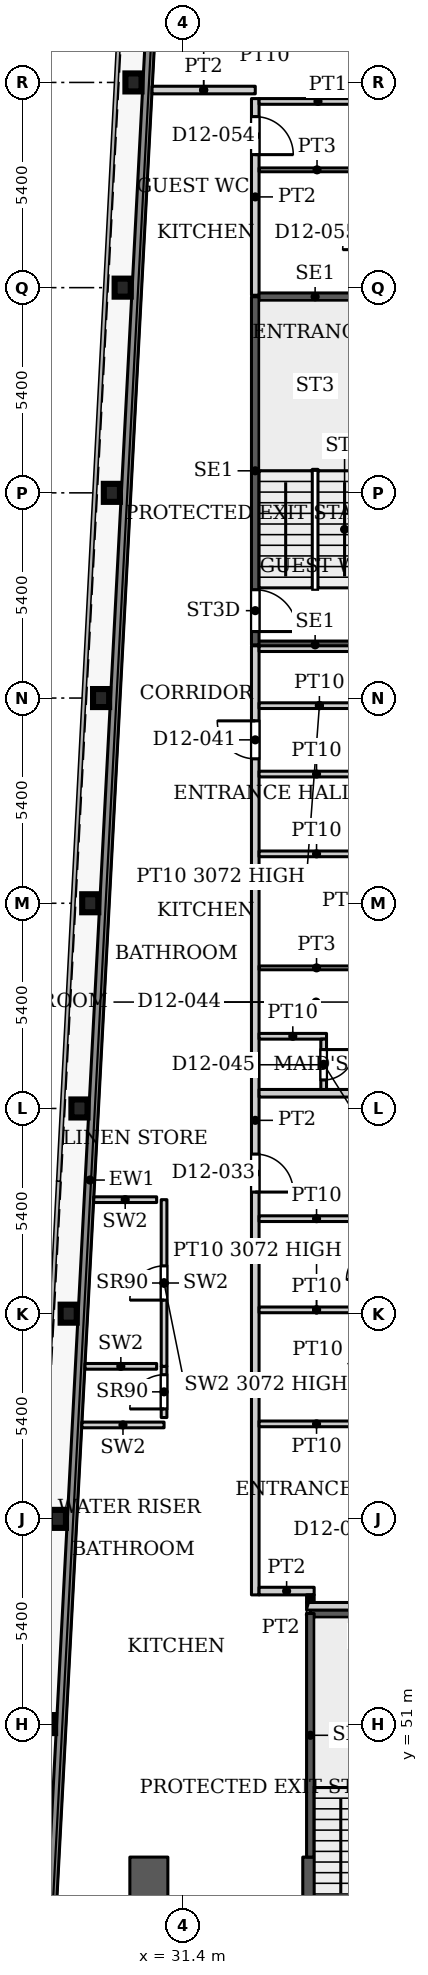
"""IFC4 building model, lengths in metres.
Left out: names, types, materials, properties, quantities, classifications, styles, units other than length and angle.
Written with IfcOpenShell. Run it as: python <this file> out.ifc"""

import sys

from ifc_helpers import new_model, si_unit, direction, frame, frame_2d, origin, origin_2d, place, context, subcontext, project, spatial, rectangle, i_section, extrude, source, transform, mapped, element, fill, save


model = new_model("IFC4")
c1 = context("Model", 3, precision=1e-05, world=origin(), true_north=direction((0.0, 1.0)))
c2 = subcontext(c1, "Body", "Model", "MODEL_VIEW")
j1 = project(units=[si_unit("LENGTHUNIT", "METRE"), si_unit("PLANEANGLEUNIT", "RADIAN")], contexts=[c1])
p1 = place(None, origin())
s1 = spatial("IfcSite", under=j1, at=p1, CompositionType="ELEMENT")
p2 = place(p1, origin())
s2 = spatial("IfcBuilding", under=s1, at=p2, CompositionType="ELEMENT")
p3 = place(p2, frame((0.0, 0.0, 57.8)))
s3 = spatial("IfcBuildingStorey", under=s2, at=p3, CompositionType="ELEMENT", Elevation=57.8)
for number, where, z_axis, x_axis in (
    (1, (27.822, 51.0, 0.0), (0.0, 0.0, 1.0), (1.0, 0.0, 0.0)),
    (2, (28.106, 56.4, 0.0), (0.0, 0.0, 1.0), (1.0, 0.0, 0.0)),
    (3, (28.39, 61.8, 0.0), (0.0, 0.0, 1.0), (1.0, 0.0, 0.0)),
    (4, (28.674, 67.2, 0.0), (0.0, 0.0, 1.0), (1.0, 0.0, 0.0)),
    (5, (28.958, 72.6, 0.0), (0.0, 0.0, 1.0), (1.0, 0.0, 0.0)),
    (6, (29.243, 78.0, 0.0), (0.0, 0.0, 1.0), (1.0, 0.0, 0.0)),
    (7, (29.527, 83.4, 0.0), (0.0, 0.0, 1.0), (1.0, 0.0, 0.0)),
    (8, (29.811, 88.8, 0.0), (0.0, 0.0, 1.0), (1.0, 0.0, 0.0)),
    (9, (30.095, 94.2, 0.0), (0.0, 0.0, 1.0), (1.0, 0.0, 0.0)),
):
    element("IfcColumn", number, at=place(p3, frame(where, z_axis=z_axis, x_axis=x_axis)), inside=s3, PredefinedType="COLUMN", context=c2, shape_type="SweptSolid", body=[
        extrude(i_section(OverallWidth=0.424, OverallDepth=0.474, WebThickness=0.048, FlangeThickness=0.077, FilletRadius=0.014, at=origin_2d()), origin(), (0.0, 0.0, 1.0), 3.9),
    ])
p4 = place(p3, frame((34.75, 29.05, 0.0), z_axis=(0.0, 0.0, 1.0), x_axis=(0.0, 1.0, 0.0)))
e10 = element("IfcWall", 10, at=p4, inside=s3, PredefinedType="SHEAR", context=c2, shape_type="SweptSolid", body=[
    extrude(rectangle(XDim=18.45, YDim=0.4, at=frame_2d((9.225, 0.0))), origin(), (0.0, 0.0, 1.0), 3.9),
])
p5 = place(p4, frame((8.025, 0.0, 0.0)))
e11 = element("IfcOpeningElement", 11, at=p5, cuts=e10, PredefinedType="OPENING", context=c2, shape_type="SweptSolid", body=[
    extrude(rectangle(XDim=1.1, YDim=2.2, at=frame_2d((0.55, 1.1))), frame((0.0, 0.21, 0.0), z_axis=(0.0, -1.0, 0.0), x_axis=(1.0, 0.0, 0.0)), (0.0, 0.0, 1.0), 0.42),
])
p6 = place(p4, frame((10.875, 0.0, 0.0)))
e12 = element("IfcOpeningElement", 12, at=p6, cuts=e10, PredefinedType="OPENING", context=c2, shape_type="SweptSolid", body=[
    extrude(rectangle(XDim=1.1, YDim=2.2, at=frame_2d((0.55, 1.1))), frame((0.0, 0.21, 0.0), z_axis=(0.0, -1.0, 0.0), x_axis=(1.0, 0.0, 0.0)), (0.0, 0.0, 1.0), 0.42),
])
p7 = place(p4, frame((13.725, 0.0, 0.0)))
e13 = element("IfcOpeningElement", 13, at=p7, cuts=e10, PredefinedType="OPENING", context=c2, shape_type="SweptSolid", body=[
    extrude(rectangle(XDim=1.1, YDim=2.2, at=frame_2d((0.55, 1.1))), frame((0.0, 0.21, 0.0), z_axis=(0.0, -1.0, 0.0), x_axis=(1.0, 0.0, 0.0)), (0.0, 0.0, 1.0), 0.42),
])
p8 = place(p4, frame((15.95, 0.0, 0.0)))
e14 = element("IfcOpeningElement", 14, at=p8, cuts=e10, PredefinedType="OPENING", context=c2, shape_type="SweptSolid", body=[
    extrude(rectangle(XDim=1.1, YDim=2.2, at=frame_2d((0.55, 1.1))), frame((0.0, 0.21, 0.0), z_axis=(0.0, -1.0, 0.0), x_axis=(1.0, 0.0, 0.0)), (0.0, 0.0, 1.0), 0.42),
])
p9 = place(p3, frame((30.5, 29.05, 0.0), z_axis=(0.0, 0.0, 1.0), x_axis=(0.0, 1.0, 0.0)))
e15 = element("IfcWall", 15, at=p9, inside=s3, PredefinedType="SHEAR", context=c2, shape_type="SweptSolid", body=[
    extrude(rectangle(XDim=18.45, YDim=1.0, at=frame_2d((9.225, 0.0))), origin(), (0.0, 0.0, 1.0), 3.9),
])
p10 = place(p9, frame((1.5, 0.0, 0.0)))
e16 = element("IfcOpeningElement", 16, at=p10, cuts=e15, PredefinedType="OPENING", context=c2, shape_type="SweptSolid", body=[
    extrude(rectangle(XDim=0.9, YDim=2.2, at=frame_2d((0.45, 1.1))), frame((0.0, 0.51, 0.0), z_axis=(0.0, -1.0, 0.0), x_axis=(1.0, 0.0, 0.0)), (0.0, 0.0, 1.0), 1.02),
])
p11 = place(p9, frame((6.03, 0.0, 0.0)))
e17 = element("IfcOpeningElement", 17, at=p11, cuts=e15, PredefinedType="OPENING", context=c2, shape_type="SweptSolid", body=[
    extrude(rectangle(XDim=0.9, YDim=2.2, at=frame_2d((0.45, 1.1))), frame((0.0, 0.51, 0.0), z_axis=(0.0, -1.0, 0.0), x_axis=(1.0, 0.0, 0.0)), (0.0, 0.0, 1.0), 1.02),
])
p12 = place(p9, frame((9.7, 0.0, 0.0)))
e18 = element("IfcOpeningElement", 18, at=p12, cuts=e15, PredefinedType="OPENING", context=c2, shape_type="SweptSolid", body=[
    extrude(rectangle(XDim=0.9, YDim=2.2, at=frame_2d((0.45, 1.1))), frame((0.0, 0.51, 0.0), z_axis=(0.0, -1.0, 0.0), x_axis=(1.0, 0.0, 0.0)), (0.0, 0.0, 1.0), 1.02),
])
p13 = place(p3, frame((27.195, 31.969, 0.0), z_axis=(0.0, 0.0, 1.0), x_axis=(0.052554995867, 0.998618031286, 0.0)))
e19 = element("IfcWall", 19, at=p13, inside=s3, PredefinedType="SOLIDWALL", context=c2, shape_type="SweptSolid", body=[
    extrude(rectangle(XDim=66.787, YDim=0.25, at=frame_2d((33.394, 0.0))), origin(), (0.0, 0.0, 1.0), 3.75),
])
p14 = place(p3, frame((34.75, 53.91, 0.0), z_axis=(0.0, 0.0, 1.0), x_axis=(1.0, 0.0, 0.0)))
e20 = element("IfcWall", 20, at=p14, inside=s3, PredefinedType="SHEAR", context=c2, shape_type="SweptSolid", body=[
    extrude(rectangle(XDim=3.15, YDim=0.2, at=frame_2d((1.575, 0.0))), origin(), (0.0, 0.0, 1.0), 3.9),
])
p15 = place(p3, frame((34.75, 47.5, 0.0), z_axis=(0.0, 0.0, 1.0), x_axis=(0.0, 1.0, 0.0)))
e21 = element("IfcWall", 21, at=p15, inside=s3, PredefinedType="SHEAR", context=c2, shape_type="SweptSolid", body=[
    extrude(rectangle(XDim=6.41, YDim=0.2, at=frame_2d((3.205, 0.0))), origin(), (0.0, 0.0, 1.0), 3.9),
])
for number, where, z_axis, x_axis in (
    (22, (33.3, 79.4, 0.0), (0.0, 0.0, 1.0), (1.0, 0.0, 0.0)),
    (23, (33.3, 88.56, 0.0), (0.0, 0.0, 1.0), (1.0, 0.0, 0.0)),
):
    element("IfcWall", number, at=place(p3, frame(where, z_axis=z_axis, x_axis=x_axis)), inside=s3, PredefinedType="SHEAR", context=c2, shape_type="SweptSolid", body=[
        extrude(rectangle(XDim=3.15, YDim=0.2, at=frame_2d((1.575, 0.0))), origin(), (0.0, 0.0, 1.0), 3.9),
    ])
p16 = place(p3, frame((33.3, 79.4, 0.0), z_axis=(0.0, 0.0, 1.0), x_axis=(0.0, 1.0, 0.0)))
e24 = element("IfcWall", 24, at=p16, inside=s3, PredefinedType="SHEAR", context=c2, shape_type="SweptSolid", body=[
    extrude(rectangle(XDim=9.16, YDim=0.2, at=frame_2d((4.58, 0.0))), origin(), (0.0, 0.0, 1.0), 3.9),
])
p17 = place(p16, frame((0.35, 0.0, 0.0)))
e25 = element("IfcOpeningElement", 25, at=p17, cuts=e24, PredefinedType="OPENING", context=c2, shape_type="SweptSolid", body=[
    extrude(rectangle(XDim=1.1, YDim=2.2, at=frame_2d((0.55, 1.1))), frame((0.0, 0.11, 0.0), z_axis=(0.0, -1.0, 0.0), x_axis=(1.0, 0.0, 0.0)), (0.0, 0.0, 1.0), 0.22),
])
p18 = place(p3, frame((28.738, 58.872, 0.0), z_axis=(0.0, 0.0, 1.0), x_axis=(1.0, 0.0, 0.0)))
e26 = element("IfcWall", 26, at=p18, inside=s3, PredefinedType="PARTITIONING", context=c2, shape_type="SweptSolid", body=[
    extrude(rectangle(XDim=2.162, YDim=0.15, at=frame_2d((1.081, 0.0))), origin(), (0.0, 0.0, 1.0), 3.9),
])
p19 = place(p3, frame((30.9, 59.067, 0.0), z_axis=(0.0, 0.0, 1.0), x_axis=(0.0, 1.0, 0.0)))
e27 = element("IfcWall", 27, at=p19, inside=s3, PredefinedType="PARTITIONING", context=c2, shape_type="SweptSolid", body=[
    extrude(rectangle(XDim=1.347, YDim=0.15, at=frame_2d((0.674, 0.0))), origin(), (0.0, 0.0, 1.0), 3.9),
])
p20 = place(p19, frame((0.226, 0.0, 0.0)))
e28 = element("IfcOpeningElement", 28, at=p20, cuts=e27, PredefinedType="OPENING", context=c2, shape_type="SweptSolid", body=[
    extrude(rectangle(XDim=0.9, YDim=2.2, at=frame_2d((0.45, 1.1))), frame((0.0, 0.085, 0.0), z_axis=(0.0, -1.0, 0.0), x_axis=(1.0, 0.0, 0.0)), (0.0, 0.0, 1.0), 0.17),
])
p21 = place(p3, frame((28.82, 60.414, 0.0), z_axis=(0.0, 0.0, 1.0), x_axis=(1.0, 0.0, 0.0)))
e29 = element("IfcWall", 29, at=p21, inside=s3, PredefinedType="PARTITIONING", context=c2, shape_type="SweptSolid", body=[
    extrude(rectangle(XDim=1.885, YDim=0.15, at=frame_2d((0.942, 0.0))), origin(), (0.0, 0.0, 1.0), 3.9),
])
p22 = place(p3, frame((30.9, 60.414, 0.0), z_axis=(0.0, 0.0, 1.0), x_axis=(0.0, 1.0, 0.0)))
e30 = element("IfcWall", 30, at=p22, inside=s3, PredefinedType="PARTITIONING", context=c2, shape_type="SweptSolid", body=[
    extrude(rectangle(XDim=4.386, YDim=0.15, at=frame_2d((2.193, 0.0))), origin(), (0.0, 0.0, 1.0), 3.072),
])
p23 = place(p22, frame((1.743, 0.0, 0.0)))
e31 = element("IfcOpeningElement", 31, at=p23, cuts=e30, PredefinedType="OPENING", context=c2, shape_type="SweptSolid", body=[
    extrude(rectangle(XDim=0.9, YDim=2.2, at=frame_2d((0.45, 1.1))), frame((0.0, 0.085, 0.0), z_axis=(0.0, -1.0, 0.0), x_axis=(1.0, 0.0, 0.0)), (0.0, 0.0, 1.0), 0.17),
])
p24 = place(p3, frame((29.05, 64.8, 0.0), z_axis=(0.0, 0.0, 1.0), x_axis=(1.0, 0.0, 0.0)))
e32 = element("IfcWall", 32, at=p24, inside=s3, PredefinedType="PARTITIONING", context=c2, shape_type="SweptSolid", body=[
    extrude(rectangle(XDim=1.655, YDim=0.15, at=frame_2d((0.828, 0.0))), origin(), (0.0, 0.0, 1.0), 3.9),
])
p25 = place(p3, frame((30.585, 94.0, 0.0), z_axis=(0.0, 0.0, 1.0), x_axis=(1.0, 0.0, 0.0)))
e33 = element("IfcWall", 33, at=p25, inside=s3, PredefinedType="PARTITIONING", context=c2, shape_type="SweptSolid", body=[
    extrude(rectangle(XDim=2.715, YDim=0.2, at=frame_2d((1.358, 0.0))), origin(), (0.0, 0.0, 1.0), 3.147),
])
p26 = place(p3, frame((33.3, 54.4, 0.0), z_axis=(0.0, 0.0, 1.0), x_axis=(0.0, 1.0, 0.0)))
e34 = element("IfcWall", 34, at=p26, inside=s3, PredefinedType="PARTITIONING", context=c2, shape_type="SweptSolid", body=[
    extrude(rectangle(XDim=24.975, YDim=0.2, at=frame_2d((12.488, 0.0))), origin(), (0.0, 0.0, 1.0), 3.6),
])
p27 = place(p26, frame((10.6, 0.0, 0.0)))
e35 = element("IfcOpeningElement", 35, at=p27, cuts=e34, PredefinedType="OPENING", context=c2, shape_type="SweptSolid", body=[
    extrude(rectangle(XDim=1.0, YDim=2.1, at=frame_2d((0.5, 1.05))), frame((0.0, 0.11, 0.0), z_axis=(0.0, -1.0, 0.0), x_axis=(1.0, 0.0, 0.0)), (0.0, 0.0, 1.0), 0.22),
])
p28 = place(p26, frame((22.0, 0.0, 0.0)))
e36 = element("IfcOpeningElement", 36, at=p28, cuts=e34, PredefinedType="OPENING", context=c2, shape_type="SweptSolid", body=[
    extrude(rectangle(XDim=1.0, YDim=2.1, at=frame_2d((0.5, 1.05))), frame((0.0, 0.11, 0.0), z_axis=(0.0, -1.0, 0.0), x_axis=(1.0, 0.0, 0.0)), (0.0, 0.0, 1.0), 0.22),
])
p29 = place(p3, frame((33.3, 88.6, 0.0), z_axis=(0.0, 0.0, 1.0), x_axis=(0.0, 1.0, 0.0)))
e37 = element("IfcWall", 37, at=p29, inside=s3, PredefinedType="PARTITIONING", context=c2, shape_type="SweptSolid", body=[
    extrude(rectangle(XDim=5.175, YDim=0.2, at=frame_2d((2.587, 0.0))), origin(), (0.0, 0.0, 1.0), 3.6),
])
p30 = place(p29, frame((3.7, 0.0, 0.0)))
e38 = element("IfcOpeningElement", 38, at=p30, cuts=e37, PredefinedType="OPENING", context=c2, shape_type="SweptSolid", body=[
    extrude(rectangle(XDim=1.0, YDim=2.1, at=frame_2d((0.5, 1.05))), frame((0.0, 0.11, 0.0), z_axis=(0.0, -1.0, 0.0), x_axis=(1.0, 0.0, 0.0)), (0.0, 0.0, 1.0), 0.22),
])
p31 = place(p3, frame((33.4, 54.5, 0.0), z_axis=(0.0, 0.0, 1.0), x_axis=(1.0, 0.0, 0.0)))
e39 = element("IfcWall", 39, at=p31, inside=s3, PredefinedType="PARTITIONING", context=c2, shape_type="SweptSolid", body=[
    extrude(rectangle(XDim=1.45, YDim=0.2, at=frame_2d((0.725, 0.0))), origin(), (0.0, 0.0, 1.0), 3.6),
])
p32 = place(p3, frame((33.4, 58.9, 0.0), z_axis=(0.0, 0.0, 1.0), x_axis=(1.0, 0.0, 0.0)))
e40 = element("IfcWall", 40, at=p32, inside=s3, PredefinedType="PARTITIONING", context=c2, shape_type="SweptSolid", body=[
    extrude(rectangle(XDim=3.025, YDim=0.15, at=frame_2d((1.513, 0.0))), origin(), (0.0, 0.0, 1.0), 3.6),
])
p33 = place(p3, frame((33.4, 61.9, 0.0), z_axis=(0.0, 0.0, 1.0), x_axis=(1.0, 0.0, 0.0)))
e41 = element("IfcWall", 41, at=p33, inside=s3, PredefinedType="PARTITIONING", context=c2, shape_type="SweptSolid", body=[
    extrude(rectangle(XDim=3.025, YDim=0.15, at=frame_2d((1.513, 0.0))), origin(), (0.0, 0.0, 1.0), 3.072),
])
p34 = place(p3, frame((33.4, 64.3, 0.0), z_axis=(0.0, 0.0, 1.0), x_axis=(1.0, 0.0, 0.0)))
e42 = element("IfcWall", 42, at=p34, inside=s3, PredefinedType="PARTITIONING", context=c2, shape_type="SweptSolid", body=[
    extrude(rectangle(XDim=3.025, YDim=0.15, at=frame_2d((1.513, 0.0))), origin(), (0.0, 0.0, 1.0), 3.6),
])
p35 = place(p3, frame((33.4, 67.6, 0.0), z_axis=(0.0, 0.0, 1.0), x_axis=(1.0, 0.0, 0.0)))
e43 = element("IfcWall", 43, at=p35, inside=s3, PredefinedType="PARTITIONING", context=c2, shape_type="SweptSolid", body=[
    extrude(rectangle(XDim=12.5, YDim=0.2, at=frame_2d((6.25, 0.0))), origin(), (0.0, 0.0, 1.0), 3.6),
])
p36 = place(p3, frame((33.4, 69.1, 0.0), z_axis=(0.0, 0.0, 1.0), x_axis=(1.0, 0.0, 0.0)))
e44 = element("IfcWall", 44, at=p36, inside=s3, PredefinedType="PARTITIONING", context=c2, shape_type="SweptSolid", body=[
    extrude(rectangle(XDim=1.775, YDim=0.15, at=frame_2d((0.888, 0.0))), origin(), (0.0, 0.0, 1.0), 3.6),
])
p37 = place(p3, frame((33.4, 70.9, 0.0), z_axis=(0.0, 0.0, 1.0), x_axis=(1.0, 0.0, 0.0)))
e45 = element("IfcWall", 45, at=p37, inside=s3, PredefinedType="PARTITIONING", context=c2, shape_type="SweptSolid", body=[
    extrude(rectangle(XDim=3.025, YDim=0.1, at=frame_2d((1.513, 0.0))), origin(), (0.0, 0.0, 1.0), 3.6),
])
for number, where, z_axis, x_axis in (
    (46, (33.4, 73.9, 0.0), (0.0, 0.0, 1.0), (1.0, 0.0, 0.0)),
    (47, (33.4, 76.0, 0.0), (0.0, 0.0, 1.0), (1.0, 0.0, 0.0)),
):
    element("IfcWall", number, at=place(p3, frame(where, z_axis=z_axis, x_axis=x_axis)), inside=s3, PredefinedType="PARTITIONING", context=c2, shape_type="SweptSolid", body=[
        extrude(rectangle(XDim=3.025, YDim=0.15, at=frame_2d((1.513, 0.0))), origin(), (0.0, 0.0, 1.0), 3.6),
    ])
p38 = place(p3, frame((33.4, 77.8, 0.0), z_axis=(0.0, 0.0, 1.0), x_axis=(1.0, 0.0, 0.0)))
e48 = element("IfcWall", 48, at=p38, inside=s3, PredefinedType="PARTITIONING", context=c2, shape_type="SweptSolid", body=[
    extrude(rectangle(XDim=3.175, YDim=0.15, at=frame_2d((1.587, 0.0))), origin(), (0.0, 0.0, 1.0), 3.072),
])
p39 = place(p3, frame((33.4, 79.3, 0.0), z_axis=(0.0, 0.0, 1.0), x_axis=(1.0, 0.0, 0.0)))
e49 = element("IfcWall", 49, at=p39, inside=s3, PredefinedType="PARTITIONING", context=c2, shape_type="SweptSolid", body=[
    extrude(rectangle(XDim=12.5, YDim=0.15, at=frame_2d((6.25, 0.0))), origin(), (0.0, 0.0, 1.0), 3.6),
])
p40 = place(p39, frame((3.35, 0.0, 0.0)))
e50 = element("IfcOpeningElement", 50, at=p40, cuts=e49, PredefinedType="OPENING", context=c2, shape_type="SweptSolid", body=[
    extrude(rectangle(XDim=0.9, YDim=2.1, at=frame_2d((0.45, 1.05))), frame((0.0, 0.085, 0.0), z_axis=(0.0, -1.0, 0.0), x_axis=(1.0, 0.0, 0.0)), (0.0, 0.0, 1.0), 0.17),
])
p41 = place(p3, frame((33.4, 91.9, 0.0), z_axis=(0.0, 0.0, 1.0), x_axis=(1.0, 0.0, 0.0)))
e51 = element("IfcWall", 51, at=p41, inside=s3, PredefinedType="PARTITIONING", context=c2, shape_type="SweptSolid", body=[
    extrude(rectangle(XDim=3.05, YDim=0.1, at=frame_2d((1.525, 0.0))), origin(), (0.0, 0.0, 1.0), 3.6),
])
p42 = place(p3, frame((33.4, 93.7, 0.0), z_axis=(0.0, 0.0, 1.0), x_axis=(1.0, 0.0, 0.0)))
e52 = element("IfcWall", 52, at=p42, inside=s3, PredefinedType="PARTITIONING", context=c2, shape_type="SweptSolid", body=[
    extrude(rectangle(XDim=3.1, YDim=0.15, at=frame_2d((1.55, 0.0))), origin(), (0.0, 0.0, 1.0), 3.6),
])
p43 = place(p3, frame((34.65, 54.1, 0.0), z_axis=(0.0, 0.0, 1.0), x_axis=(1.0, 0.0, 0.0)))
e53 = element("IfcWall", 53, at=p43, inside=s3, PredefinedType="PARTITIONING", context=c2, shape_type="SweptSolid", body=[
    extrude(rectangle(XDim=11.25, YDim=0.2, at=frame_2d((5.625, 0.0))), origin(), (0.0, 0.0, 1.0), 3.6),
])
p44 = place(p3, frame((34.75, 54.2, 0.0), z_axis=(0.0, 0.0, 1.0), x_axis=(0.0, 1.0, 0.0)))
e54 = element("IfcWall", 54, at=p44, inside=s3, PredefinedType="PARTITIONING", context=c2, shape_type="SweptSolid", body=[
    extrude(rectangle(XDim=0.2, YDim=0.2, at=frame_2d((0.1, 0.0))), origin(), (0.0, 0.0, 1.0), 3.6),
])
p45 = place(p3, frame((35.1, 67.7, 0.0), z_axis=(0.0, 0.0, 1.0), x_axis=(0.0, 1.0, 0.0)))
e55 = element("IfcWall", 55, at=p45, inside=s3, PredefinedType="PARTITIONING", context=c2, shape_type="SweptSolid", body=[
    extrude(rectangle(XDim=1.325, YDim=0.15, at=frame_2d((0.663, 0.0))), origin(), (0.0, 0.0, 1.0), 3.6),
])
p46 = place(p45, frame((0.25, 0.0, 0.0)))
e56 = element("IfcOpeningElement", 56, at=p46, cuts=e55, PredefinedType="OPENING", context=c2, shape_type="SweptSolid", body=[
    extrude(rectangle(XDim=0.8, YDim=2.1, at=frame_2d((0.4, 1.05))), frame((0.0, 0.085, 0.0), z_axis=(0.0, -1.0, 0.0), x_axis=(1.0, 0.0, 0.0)), (0.0, 0.0, 1.0), 0.17),
])
m1 = source(origin(), c2, "Body", "SweptSolid", [
    extrude(rectangle(XDim=0.9, YDim=2.2, at=frame_2d((0.45, 1.1))), frame((0.0, 0.025, 0.0), z_axis=(0.0, -1.0, 0.0), x_axis=(1.0, 0.0, 0.0)), (0.0, 0.0, 1.0), 0.05),
])
p47 = place(p20, origin())
e57 = element("IfcDoor", 57, at=p47, inside=s3, OperationType="SINGLE_SWING_LEFT", PredefinedType="DOOR", context=c2, shape_type="MappedRepresentation", body=[
    mapped(m1, transform((0.0, 0.0, 0.0), x_axis=(1.0, 0.0, 0.0), y_axis=(0.0, 1.0, 0.0), z_axis=(0.0, 0.0, 1.0), scale=1.0)),
])
fill(e28, e57)
p48 = place(p23, origin())
e58 = element("IfcDoor", 58, at=p48, inside=s3, OperationType="SINGLE_SWING_LEFT", PredefinedType="DOOR", context=c2, shape_type="MappedRepresentation", body=[
    mapped(m1, transform((0.0, 0.0, 0.0), x_axis=(1.0, 0.0, 0.0), y_axis=(0.0, 1.0, 0.0), z_axis=(0.0, 0.0, 1.0), scale=1.0)),
])
fill(e31, e58)
m2 = source(origin(), c2, "Body", "SweptSolid", [
    extrude(rectangle(XDim=1.1, YDim=2.2, at=frame_2d((0.55, 1.1))), frame((0.0, 0.025, 0.0), z_axis=(0.0, -1.0, 0.0), x_axis=(1.0, 0.0, 0.0)), (0.0, 0.0, 1.0), 0.05),
])
p49 = place(p17, origin())
e59 = element("IfcDoor", 59, at=p49, inside=s3, OperationType="SINGLE_SWING_RIGHT", PredefinedType="DOOR", context=c2, shape_type="MappedRepresentation", body=[
    mapped(m2, transform((0.0, 0.0, 0.0), x_axis=(1.0, 0.0, 0.0), y_axis=(0.0, 1.0, 0.0), z_axis=(0.0, 0.0, 1.0), scale=1.0)),
])
fill(e25, e59)
m3 = source(origin(), c2, "Body", "SweptSolid", [
    extrude(rectangle(XDim=1.0, YDim=2.1, at=frame_2d((0.5, 1.05))), frame((0.0, 0.025, 0.0), z_axis=(0.0, -1.0, 0.0), x_axis=(1.0, 0.0, 0.0)), (0.0, 0.0, 1.0), 0.05),
])
p50 = place(p27, origin())
e60 = element("IfcDoor", 60, at=p50, inside=s3, OperationType="SINGLE_SWING_RIGHT", PredefinedType="DOOR", context=c2, shape_type="MappedRepresentation", body=[
    mapped(m3, transform((0.0, 0.0, 0.0), x_axis=(1.0, 0.0, 0.0), y_axis=(0.0, 1.0, 0.0), z_axis=(0.0, 0.0, 1.0), scale=1.0)),
])
fill(e35, e60)
p51 = place(p28, origin())
e61 = element("IfcDoor", 61, at=p51, inside=s3, OperationType="SINGLE_SWING_LEFT", PredefinedType="DOOR", context=c2, shape_type="MappedRepresentation", body=[
    mapped(m3, transform((0.0, 0.0, 0.0), x_axis=(1.0, 0.0, 0.0), y_axis=(0.0, 1.0, 0.0), z_axis=(0.0, 0.0, 1.0), scale=1.0)),
])
fill(e36, e61)
m4 = source(origin(), c2, "Body", "SweptSolid", [
    extrude(rectangle(XDim=0.8, YDim=2.1, at=frame_2d((0.4, 1.05))), frame((0.0, 0.025, 0.0), z_axis=(0.0, -1.0, 0.0), x_axis=(1.0, 0.0, 0.0)), (0.0, 0.0, 1.0), 0.05),
])
p52 = place(p46, origin())
e62 = element("IfcDoor", 62, at=p52, inside=s3, OperationType="SINGLE_SWING_RIGHT", PredefinedType="DOOR", context=c2, shape_type="MappedRepresentation", body=[
    mapped(m4, transform((0.0, 0.0, 0.0), x_axis=(1.0, 0.0, 0.0), y_axis=(0.0, 1.0, 0.0), z_axis=(0.0, 0.0, 1.0), scale=1.0)),
])
fill(e56, e62)
p53 = place(p30, origin())
e63 = element("IfcDoor", 63, at=p53, inside=s3, OperationType="SINGLE_SWING_RIGHT", PredefinedType="DOOR", context=c2, shape_type="MappedRepresentation", body=[
    mapped(m3, transform((0.0, 0.0, 0.0), x_axis=(1.0, 0.0, 0.0), y_axis=(0.0, 1.0, 0.0), z_axis=(0.0, 0.0, 1.0), scale=1.0)),
])
fill(e38, e63)
save(model, sys.argv[1])
